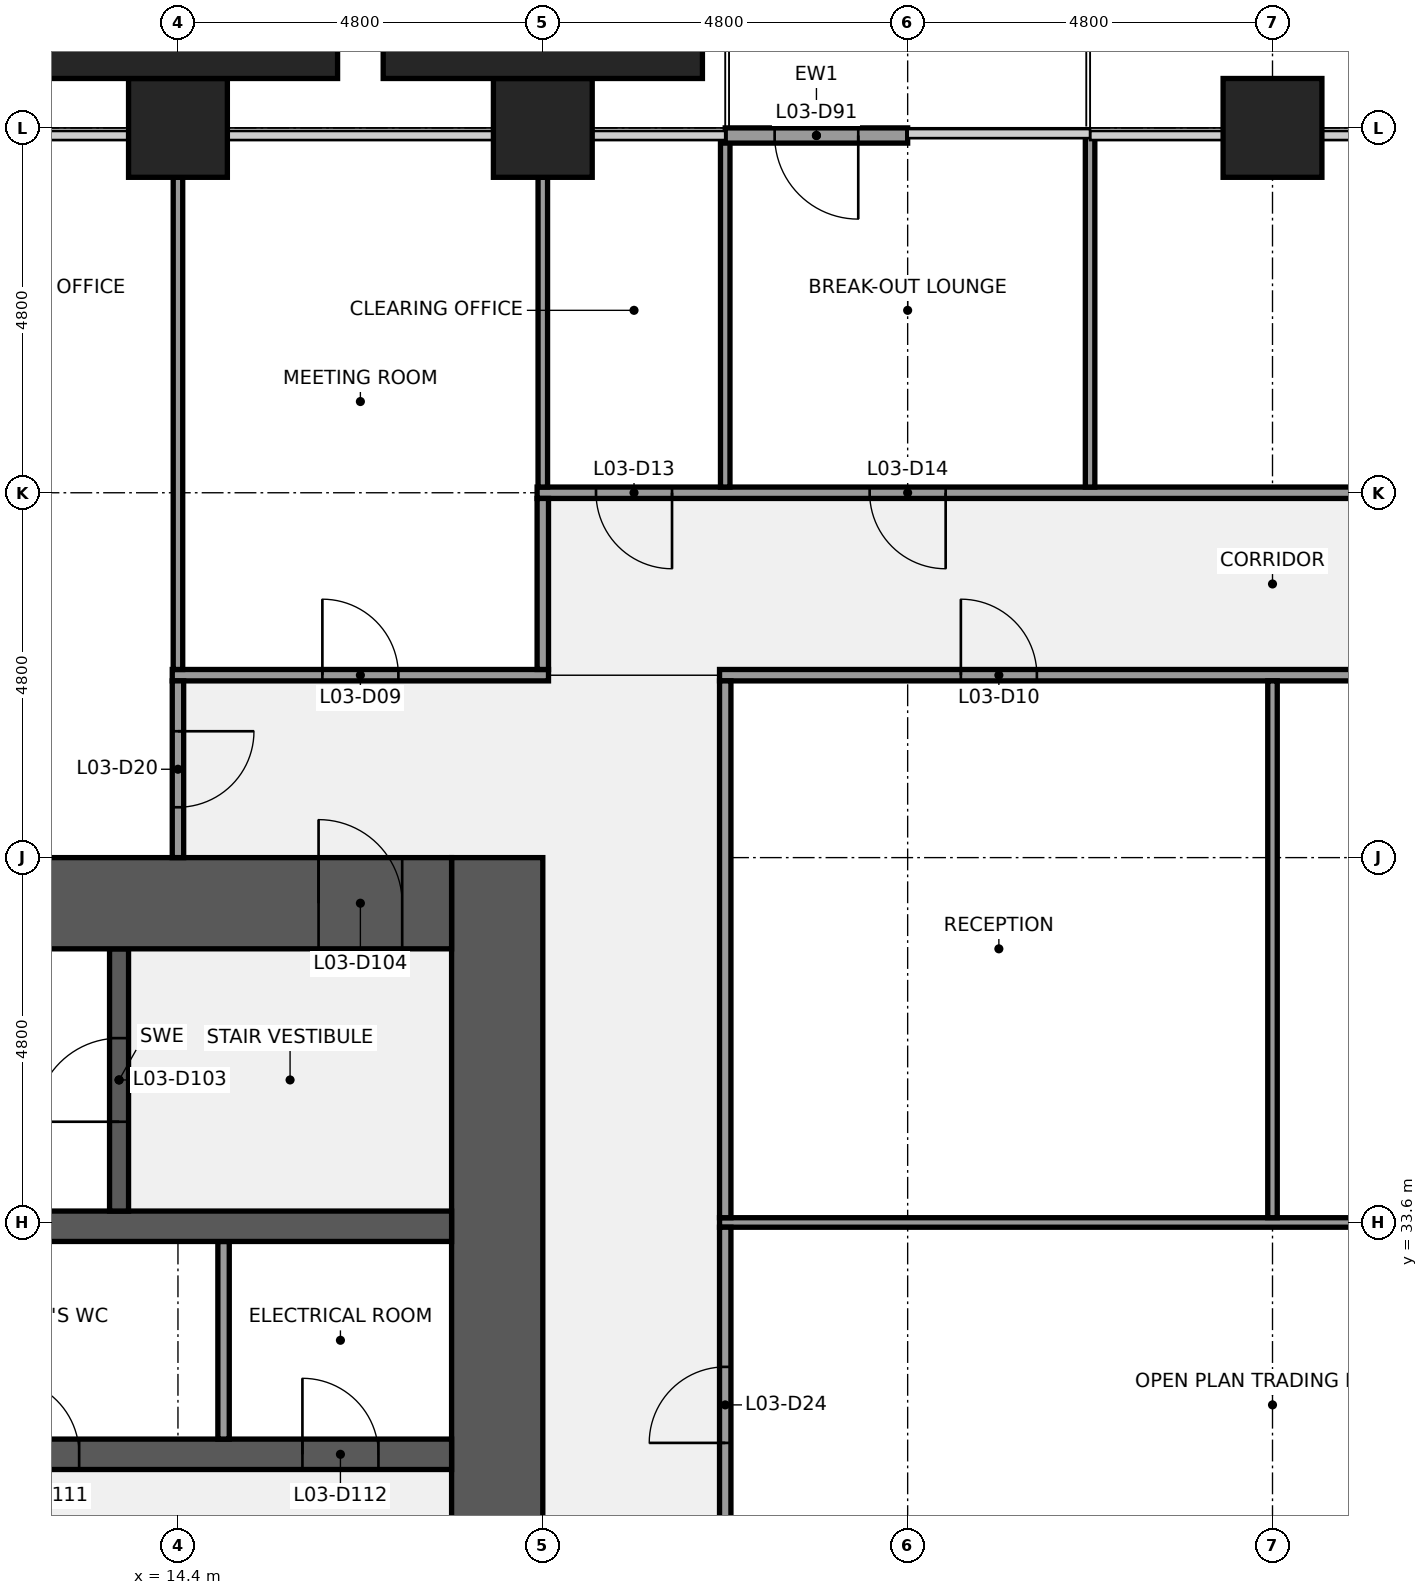
"""IFC4 building model, lengths in metres.
Left out: names, types, materials, properties, quantities, classifications, styles, units other than length and angle.
Written with IfcOpenShell. Run it as: python <this file> out.ifc"""

import sys

from ifc_helpers import new_model, si_unit, direction, frame, frame_2d, origin, origin_2d, place, context, subcontext, project, spatial, rectangle, extrude, element, fill, save


model = new_model("IFC4")
c1 = context("Model", 3, precision=1e-05, world=origin(), true_north=direction((0.0, 1.0)))
c2 = subcontext(c1, "Body", "Model", "MODEL_VIEW")
j1 = project(units=[si_unit("LENGTHUNIT", "METRE"), si_unit("PLANEANGLEUNIT", "RADIAN")], contexts=[c1])
p1 = place(None, origin())
s1 = spatial("IfcSite", under=j1, at=p1, CompositionType="ELEMENT")
p2 = place(p1, origin())
s2 = spatial("IfcBuilding", under=s1, at=p2, CompositionType="ELEMENT")
p3 = place(p2, frame((0.0, 0.0, 21.4)))
s3 = spatial("IfcBuildingStorey", under=s2, at=p3, CompositionType="ELEMENT", Elevation=21.4)
for number, where, z_axis, x_axis in (
    (1, (14.4, 48.0, 0.0), (0.0, 0.0, 1.0), (1.0, 0.0, 0.0)),
    (2, (19.2, 48.0, 0.0), (0.0, 0.0, 1.0), (1.0, 0.0, 0.0)),
    (3, (28.8, 48.0, 0.0), (0.0, 0.0, 1.0), (1.0, 0.0, 0.0)),
):
    element("IfcColumn", number, at=place(p3, frame(where, z_axis=z_axis, x_axis=x_axis)), inside=s3, PredefinedType="COLUMN", context=c2, shape_type="SweptSolid", body=[
        extrude(rectangle(XDim=1.3, YDim=1.3, at=origin_2d()), origin(), (0.0, 0.0, 1.0), 4.4),
    ])
p4 = place(p3, frame((18.6, 38.4, 0.0), z_axis=(0.0, 0.0, 1.0), x_axis=(0.0, -1.0, 0.0)))
e4 = element("IfcWall", 4, at=p4, inside=s3, PredefinedType="SHEAR", context=c2, shape_type="SweptSolid", body=[
    extrude(rectangle(XDim=28.8, YDim=1.2, at=frame_2d((14.4, 0.0))), origin(), (0.0, 0.0, 1.0), 4.24),
])
p5 = place(p4, frame((18.3, 0.0, 0.0)))
e5 = element("IfcOpeningElement", 5, at=p5, cuts=e4, PredefinedType="OPENING", context=c2, shape_type="SweptSolid", body=[
    extrude(rectangle(XDim=1.8, YDim=2.1, at=frame_2d((0.9, 1.05))), frame((0.0, 0.61, 0.0), z_axis=(0.0, -1.0, 0.0), x_axis=(1.0, 0.0, 0.0)), (0.0, 0.0, 1.0), 1.22),
])
p6 = place(p4, frame((8.7, 0.0, 0.0)))
e6 = element("IfcOpeningElement", 6, at=p6, cuts=e4, PredefinedType="OPENING", context=c2, shape_type="SweptSolid", body=[
    extrude(rectangle(XDim=1.8, YDim=2.1, at=frame_2d((0.9, 1.05))), frame((0.0, 0.61, 0.0), z_axis=(0.0, -1.0, 0.0), x_axis=(1.0, 0.0, 0.0)), (0.0, 0.0, 1.0), 1.22),
])
p7 = place(p3, frame((1.2, 30.55, 0.0), z_axis=(0.0, 0.0, 1.0), x_axis=(1.0, 0.0, 0.0)))
e7 = element("IfcWall", 7, at=p7, inside=s3, PredefinedType="SHEAR", context=c2, shape_type="SweptSolid", body=[
    extrude(rectangle(XDim=16.8, YDim=0.4, at=frame_2d((8.4, 0.0))), origin(), (0.0, 0.0, 1.0), 4.24),
])
p8 = place(p7, frame((1.863, 0.0, 0.0)))
e8 = element("IfcOpeningElement", 8, at=p8, cuts=e7, PredefinedType="OPENING", context=c2, shape_type="SweptSolid", body=[
    extrude(rectangle(XDim=1.0, YDim=2.1, at=frame_2d((0.5, 1.05))), frame((0.0, 0.21, 0.0), z_axis=(0.0, -1.0, 0.0), x_axis=(1.0, 0.0, 0.0)), (0.0, 0.0, 1.0), 0.42),
])
p9 = place(p7, frame((6.4, 0.0, 0.0)))
e9 = element("IfcOpeningElement", 9, at=p9, cuts=e7, PredefinedType="OPENING", context=c2, shape_type="SweptSolid", body=[
    extrude(rectangle(XDim=1.0, YDim=2.1, at=frame_2d((0.5, 1.05))), frame((0.0, 0.21, 0.0), z_axis=(0.0, -1.0, 0.0), x_axis=(1.0, 0.0, 0.0)), (0.0, 0.0, 1.0), 0.42),
])
p10 = place(p7, frame((10.9, 0.0, 0.0)))
e10 = element("IfcOpeningElement", 10, at=p10, cuts=e7, PredefinedType="OPENING", context=c2, shape_type="SweptSolid", body=[
    extrude(rectangle(XDim=1.0, YDim=2.1, at=frame_2d((0.5, 1.05))), frame((0.0, 0.21, 0.0), z_axis=(0.0, -1.0, 0.0), x_axis=(1.0, 0.0, 0.0)), (0.0, 0.0, 1.0), 0.42),
])
p11 = place(p7, frame((14.837, 0.0, 0.0)))
e11 = element("IfcOpeningElement", 11, at=p11, cuts=e7, PredefinedType="OPENING", context=c2, shape_type="SweptSolid", body=[
    extrude(rectangle(XDim=1.0, YDim=2.1, at=frame_2d((0.5, 1.05))), frame((0.0, 0.21, 0.0), z_axis=(0.0, -1.0, 0.0), x_axis=(1.0, 0.0, 0.0)), (0.0, 0.0, 1.0), 0.42),
])
p12 = place(p3, frame((15.0, 30.75, 0.0), z_axis=(0.0, 0.0, 1.0), x_axis=(0.0, 1.0, 0.0)))
e12 = element("IfcWall", 12, at=p12, inside=s3, PredefinedType="PARTITIONING", context=c2, shape_type="SweptSolid", body=[
    extrude(rectangle(XDim=2.6, YDim=0.15, at=frame_2d((1.3, 0.0))), origin(), (0.0, 0.0, 1.0), 4.24),
])
p13 = place(p3, frame((1.2, 33.55, 0.0), z_axis=(0.0, 0.0, 1.0), x_axis=(1.0, 0.0, 0.0)))
e13 = element("IfcWall", 13, at=p13, inside=s3, PredefinedType="SHEAR", context=c2, shape_type="SweptSolid", body=[
    extrude(rectangle(XDim=16.8, YDim=0.4, at=frame_2d((8.4, 0.0))), origin(), (0.0, 0.0, 1.0), 4.24),
])
p14 = place(p3, frame((13.625, 33.75, 0.0), z_axis=(0.0, 0.0, 1.0), x_axis=(0.0, 1.0, 0.0)))
e14 = element("IfcWall", 14, at=p14, inside=s3, PredefinedType="SHEAR", context=c2, shape_type="SweptSolid", body=[
    extrude(rectangle(XDim=3.45, YDim=0.25, at=frame_2d((1.725, 0.0))), origin(), (0.0, 0.0, 1.0), 4.24),
])
p15 = place(p14, frame((1.175, 0.0, 0.0)))
e15 = element("IfcOpeningElement", 15, at=p15, cuts=e14, PredefinedType="OPENING", context=c2, shape_type="SweptSolid", body=[
    extrude(rectangle(XDim=1.1, YDim=2.1, at=frame_2d((0.55, 1.05))), frame((0.0, 0.135, 0.0), z_axis=(0.0, -1.0, 0.0), x_axis=(1.0, 0.0, 0.0)), (0.0, 0.0, 1.0), 0.27),
])
p16 = place(p3, frame((4.8, 37.8, 0.0), z_axis=(0.0, 0.0, 1.0), x_axis=(1.0, 0.0, 0.0)))
e16 = element("IfcWall", 16, at=p16, inside=s3, PredefinedType="SHEAR", context=c2, shape_type="SweptSolid", body=[
    extrude(rectangle(XDim=13.2, YDim=1.2, at=frame_2d((6.6, 0.0))), origin(), (0.0, 0.0, 1.0), 4.24),
])
p17 = place(p16, frame((11.45, 0.0, 0.0)))
e17 = element("IfcOpeningElement", 17, at=p17, cuts=e16, PredefinedType="OPENING", context=c2, shape_type="SweptSolid", body=[
    extrude(rectangle(XDim=1.1, YDim=2.1, at=frame_2d((0.55, 1.05))), frame((0.0, 0.61, 0.0), z_axis=(0.0, -1.0, 0.0), x_axis=(1.0, 0.0, 0.0)), (0.0, 0.0, 1.0), 1.22),
])
p18 = place(p3, frame((21.525, 33.6, 0.0), z_axis=(0.0, 0.0, 1.0), x_axis=(1.0, 0.0, 0.0)))
e18 = element("IfcWall", 18, at=p18, inside=s3, PredefinedType="PARTITIONING", context=c2, shape_type="SweptSolid", body=[
    extrude(rectangle(XDim=14.55, YDim=0.125, at=frame_2d((7.275, 0.0))), origin(), (0.0, 0.0, 1.0), 3.27),
])
p19 = place(p3, frame((14.325, 40.8, 0.0), z_axis=(0.0, 0.0, 1.0), x_axis=(1.0, 0.0, 0.0)))
e19 = element("IfcWall", 19, at=p19, inside=s3, PredefinedType="PARTITIONING", context=c2, shape_type="SweptSolid", body=[
    extrude(rectangle(XDim=4.95, YDim=0.15, at=frame_2d((2.475, 0.0))), origin(), (0.0, 0.0, 1.0), 3.27),
])
p20 = place(p19, frame((1.975, 0.0, 0.0)))
e20 = element("IfcOpeningElement", 20, at=p20, cuts=e19, PredefinedType="OPENING", context=c2, shape_type="SweptSolid", body=[
    extrude(rectangle(XDim=1.0, YDim=2.1, at=frame_2d((0.5, 1.05))), frame((0.0, 0.085, 0.0), z_axis=(0.0, -1.0, 0.0), x_axis=(1.0, 0.0, 0.0)), (0.0, 0.0, 1.0), 0.17),
])
p21 = place(p3, frame((21.525, 40.8, 0.0), z_axis=(0.0, 0.0, 1.0), x_axis=(1.0, 0.0, 0.0)))
e21 = element("IfcWall", 21, at=p21, inside=s3, PredefinedType="PARTITIONING", context=c2, shape_type="SweptSolid", body=[
    extrude(rectangle(XDim=14.55, YDim=0.15, at=frame_2d((7.275, 0.0))), origin(), (0.0, 0.0, 1.0), 3.27),
])
p22 = place(p21, frame((3.175, 0.0, 0.0)))
e22 = element("IfcOpeningElement", 22, at=p22, cuts=e21, PredefinedType="OPENING", context=c2, shape_type="SweptSolid", body=[
    extrude(rectangle(XDim=1.0, YDim=2.1, at=frame_2d((0.5, 1.05))), frame((0.0, 0.085, 0.0), z_axis=(0.0, -1.0, 0.0), x_axis=(1.0, 0.0, 0.0)), (0.0, 0.0, 1.0), 0.17),
])
p23 = place(p21, frame((10.375, 0.0, 0.0)))
e23 = element("IfcOpeningElement", 23, at=p23, cuts=e21, PredefinedType="OPENING", context=c2, shape_type="SweptSolid", body=[
    extrude(rectangle(XDim=1.0, YDim=2.1, at=frame_2d((0.5, 1.05))), frame((0.0, 0.085, 0.0), z_axis=(0.0, -1.0, 0.0), x_axis=(1.0, 0.0, 0.0)), (0.0, 0.0, 1.0), 0.17),
])
p24 = place(p3, frame((19.125, 43.2, 0.0), z_axis=(0.0, 0.0, 1.0), x_axis=(1.0, 0.0, 0.0)))
e24 = element("IfcWall", 24, at=p24, inside=s3, PredefinedType="PARTITIONING", context=c2, shape_type="SweptSolid", body=[
    extrude(rectangle(XDim=19.35, YDim=0.15, at=frame_2d((9.675, 0.0))), origin(), (0.0, 0.0, 1.0), 3.27),
])
p25 = place(p24, frame((0.775, 0.0, 0.0)))
e25 = element("IfcOpeningElement", 25, at=p25, cuts=e24, PredefinedType="OPENING", context=c2, shape_type="SweptSolid", body=[
    extrude(rectangle(XDim=1.0, YDim=2.1, at=frame_2d((0.5, 1.05))), frame((0.0, 0.085, 0.0), z_axis=(0.0, -1.0, 0.0), x_axis=(1.0, 0.0, 0.0)), (0.0, 0.0, 1.0), 0.17),
])
p26 = place(p24, frame((4.375, 0.0, 0.0)))
e26 = element("IfcOpeningElement", 26, at=p26, cuts=e24, PredefinedType="OPENING", context=c2, shape_type="SweptSolid", body=[
    extrude(rectangle(XDim=1.0, YDim=2.1, at=frame_2d((0.5, 1.05))), frame((0.0, 0.085, 0.0), z_axis=(0.0, -1.0, 0.0), x_axis=(1.0, 0.0, 0.0)), (0.0, 0.0, 1.0), 0.17),
])
p27 = place(p24, frame((12.775, 0.0, 0.0)))
e27 = element("IfcOpeningElement", 27, at=p27, cuts=e24, PredefinedType="OPENING", context=c2, shape_type="SweptSolid", body=[
    extrude(rectangle(XDim=1.0, YDim=2.1, at=frame_2d((0.5, 1.05))), frame((0.0, 0.085, 0.0), z_axis=(0.0, -1.0, 0.0), x_axis=(1.0, 0.0, 0.0)), (0.0, 0.0, 1.0), 0.17),
])
p28 = place(p3, frame((14.4, 40.875, 0.0), z_axis=(0.0, 0.0, 1.0), x_axis=(0.0, 1.0, 0.0)))
e28 = element("IfcWall", 28, at=p28, inside=s3, PredefinedType="PARTITIONING", context=c2, shape_type="SweptSolid", body=[
    extrude(rectangle(XDim=6.475, YDim=0.125, at=frame_2d((3.238, 0.0))), origin(), (0.0, 0.0, 1.0), 3.27),
])
p29 = place(p3, frame((14.4, 38.4, 0.0), z_axis=(0.0, 0.0, 1.0), x_axis=(0.0, 1.0, 0.0)))
e29 = element("IfcWall", 29, at=p29, inside=s3, PredefinedType="PARTITIONING", context=c2, shape_type="SweptSolid", body=[
    extrude(rectangle(XDim=2.325, YDim=0.15, at=frame_2d((1.163, 0.0))), origin(), (0.0, 0.0, 1.0), 3.27),
])
p30 = place(p29, frame((0.663, 0.0, 0.0)))
e30 = element("IfcOpeningElement", 30, at=p30, cuts=e29, PredefinedType="OPENING", context=c2, shape_type="SweptSolid", body=[
    extrude(rectangle(XDim=1.0, YDim=2.1, at=frame_2d((0.5, 1.05))), frame((0.0, 0.085, 0.0), z_axis=(0.0, -1.0, 0.0), x_axis=(1.0, 0.0, 0.0)), (0.0, 0.0, 1.0), 0.17),
])
p31 = place(p3, frame((19.2, 43.275, 0.0), z_axis=(0.0, 0.0, 1.0), x_axis=(0.0, 1.0, 0.0)))
e31 = element("IfcWall", 31, at=p31, inside=s3, PredefinedType="PARTITIONING", context=c2, shape_type="SweptSolid", body=[
    extrude(rectangle(XDim=4.075, YDim=0.125, at=frame_2d((2.038, 0.0))), origin(), (0.0, 0.0, 1.0), 3.27),
])
p32 = place(p3, frame((19.2, 40.875, 0.0), z_axis=(0.0, 0.0, 1.0), x_axis=(0.0, 1.0, 0.0)))
e32 = element("IfcWall", 32, at=p32, inside=s3, PredefinedType="PARTITIONING", context=c2, shape_type="SweptSolid", body=[
    extrude(rectangle(XDim=2.25, YDim=0.15, at=frame_2d((1.125, 0.0))), origin(), (0.0, 0.0, 1.0), 3.27),
])
p33 = place(p3, frame((21.6, 43.275, 0.0), z_axis=(0.0, 0.0, 1.0), x_axis=(0.0, 1.0, 0.0)))
e33 = element("IfcWall", 33, at=p33, inside=s3, PredefinedType="PARTITIONING", context=c2, shape_type="SweptSolid", body=[
    extrude(rectangle(XDim=4.625, YDim=0.125, at=frame_2d((2.312, 0.0))), origin(), (0.0, 0.0, 1.0), 3.27),
])
p34 = place(p3, frame((21.6, 28.863, 0.0), z_axis=(0.0, 0.0, 1.0), x_axis=(0.0, 1.0, 0.0)))
e34 = element("IfcWall", 34, at=p34, inside=s3, PredefinedType="PARTITIONING", context=c2, shape_type="SweptSolid", body=[
    extrude(rectangle(XDim=4.675, YDim=0.15, at=frame_2d((2.337, 0.0))), origin(), (0.0, 0.0, 1.0), 3.27),
])
p35 = place(p34, frame((1.837, 0.0, 0.0)))
e35 = element("IfcOpeningElement", 35, at=p35, cuts=e34, PredefinedType="OPENING", context=c2, shape_type="SweptSolid", body=[
    extrude(rectangle(XDim=1.0, YDim=2.1, at=frame_2d((0.5, 1.05))), frame((0.0, 0.085, 0.0), z_axis=(0.0, -1.0, 0.0), x_axis=(1.0, 0.0, 0.0)), (0.0, 0.0, 1.0), 0.17),
])
p36 = place(p3, frame((21.6, 33.663, 0.0), z_axis=(0.0, 0.0, 1.0), x_axis=(0.0, 1.0, 0.0)))
e36 = element("IfcWall", 36, at=p36, inside=s3, PredefinedType="PARTITIONING", context=c2, shape_type="SweptSolid", body=[
    extrude(rectangle(XDim=7.062, YDim=0.15, at=frame_2d((3.531, 0.0))), origin(), (0.0, 0.0, 1.0), 3.27),
])
p37 = place(p3, frame((26.4, 43.275, 0.0), z_axis=(0.0, 0.0, 1.0), x_axis=(0.0, 1.0, 0.0)))
e37 = element("IfcWall", 37, at=p37, inside=s3, PredefinedType="PARTITIONING", context=c2, shape_type="SweptSolid", body=[
    extrude(rectangle(XDim=4.625, YDim=0.125, at=frame_2d((2.312, 0.0))), origin(), (0.0, 0.0, 1.0), 3.27),
])
p38 = place(p3, frame((28.8, 33.663, 0.0), z_axis=(0.0, 0.0, 1.0), x_axis=(0.0, 1.0, 0.0)))
e38 = element("IfcWall", 38, at=p38, inside=s3, PredefinedType="PARTITIONING", context=c2, shape_type="SweptSolid", body=[
    extrude(rectangle(XDim=7.062, YDim=0.125, at=frame_2d((3.531, 0.0))), origin(), (0.0, 0.0, 1.0), 3.27),
])
p39 = place(p3, frame((24.0, 47.9, 0.0), z_axis=(0.0, 0.0, 1.0), x_axis=(-1.0, 0.0, 0.0)))
e39 = element("IfcWall", 39, at=p39, inside=s3, PredefinedType="SOLIDWALL", context=c2, shape_type="SweptSolid", body=[
    extrude(rectangle(XDim=2.4, YDim=0.2, at=frame_2d((1.2, 0.0))), origin(), (0.0, 0.0, 1.0), 3.714),
])
p40 = place(p39, frame((0.65, 0.0, 0.0)))
e40 = element("IfcOpeningElement", 40, at=p40, cuts=e39, PredefinedType="OPENING", context=c2, shape_type="SweptSolid", body=[
    extrude(rectangle(XDim=1.1, YDim=2.1, at=frame_2d((0.55, 1.05))), frame((0.0, 0.11, 0.0), z_axis=(0.0, -1.0, 0.0), x_axis=(1.0, 0.0, 0.0)), (0.0, 0.0, 1.0), 0.22),
])
for number, where, z_axis, x_axis in (
    (41, (14.4, 49.075, 0.0), (0.0, 0.0, 1.0), (1.0, 0.0, 0.0)),
    (42, (19.2, 49.075, 0.0), (0.0, 0.0, 1.0), (1.0, 0.0, 0.0)),
):
    element("IfcColumn", number, at=place(p3, frame(where, z_axis=z_axis, x_axis=x_axis)), inside=s3, PredefinedType="PILASTER", context=c2, shape_type="SweptSolid", body=[
        extrude(rectangle(XDim=4.2, YDim=0.85, at=origin_2d()), origin(), (0.0, 0.0, 1.0), 4.4),
    ])
p41 = place(p15, origin())
e43 = element("IfcDoor", 43, at=p41, inside=s3, OperationType="SINGLE_SWING_LEFT", PredefinedType="DOOR", context=c2, shape_type="SweptSolid", body=[
    extrude(rectangle(XDim=1.1, YDim=2.1, at=frame_2d((0.55, 1.05))), frame((0.0, 0.025, 0.0), z_axis=(0.0, -1.0, 0.0), x_axis=(1.0, 0.0, 0.0)), (0.0, 0.0, 1.0), 0.05),
])
fill(e15, e43)
p42 = place(p17, origin())
e44 = element("IfcDoor", 44, at=p42, inside=s3, OperationType="SINGLE_SWING_LEFT", PredefinedType="DOOR", context=c2, shape_type="SweptSolid", body=[
    extrude(rectangle(XDim=1.1, YDim=2.1, at=frame_2d((0.55, 1.05))), frame((0.0, 0.025, 0.0), z_axis=(0.0, -1.0, 0.0), x_axis=(1.0, 0.0, 0.0)), (0.0, 0.0, 1.0), 0.05),
])
fill(e17, e44)
p43 = place(p10, origin())
e45 = element("IfcDoor", 45, at=p43, inside=s3, OperationType="SINGLE_SWING_LEFT", PredefinedType="DOOR", context=c2, shape_type="SweptSolid", body=[
    extrude(rectangle(XDim=1.0, YDim=2.1, at=frame_2d((0.5, 1.05))), frame((0.0, 0.025, 0.0), z_axis=(0.0, -1.0, 0.0), x_axis=(1.0, 0.0, 0.0)), (0.0, 0.0, 1.0), 0.05),
])
fill(e10, e45)
p44 = place(p11, origin())
e46 = element("IfcDoor", 46, at=p44, inside=s3, OperationType="SINGLE_SWING_LEFT", PredefinedType="DOOR", context=c2, shape_type="SweptSolid", body=[
    extrude(rectangle(XDim=1.0, YDim=2.1, at=frame_2d((0.5, 1.05))), frame((0.0, 0.025, 0.0), z_axis=(0.0, -1.0, 0.0), x_axis=(1.0, 0.0, 0.0)), (0.0, 0.0, 1.0), 0.05),
])
fill(e11, e46)
p45 = place(p20, origin())
e47 = element("IfcDoor", 47, at=p45, inside=s3, OperationType="SINGLE_SWING_LEFT", PredefinedType="DOOR", context=c2, shape_type="SweptSolid", body=[
    extrude(rectangle(XDim=1.0, YDim=2.1, at=frame_2d((0.5, 1.05))), frame((0.0, 0.025, 0.0), z_axis=(0.0, -1.0, 0.0), x_axis=(1.0, 0.0, 0.0)), (0.0, 0.0, 1.0), 0.05),
])
fill(e20, e47)
p46 = place(p22, origin())
e48 = element("IfcDoor", 48, at=p46, inside=s3, OperationType="SINGLE_SWING_LEFT", PredefinedType="DOOR", context=c2, shape_type="SweptSolid", body=[
    extrude(rectangle(XDim=1.0, YDim=2.1, at=frame_2d((0.5, 1.05))), frame((0.0, 0.025, 0.0), z_axis=(0.0, -1.0, 0.0), x_axis=(1.0, 0.0, 0.0)), (0.0, 0.0, 1.0), 0.05),
])
fill(e22, e48)
p47 = place(p25, origin())
e49 = element("IfcDoor", 49, at=p47, inside=s3, OperationType="SINGLE_SWING_RIGHT", PredefinedType="DOOR", context=c2, shape_type="SweptSolid", body=[
    extrude(rectangle(XDim=1.0, YDim=2.1, at=frame_2d((0.5, 1.05))), frame((0.0, 0.025, 0.0), z_axis=(0.0, -1.0, 0.0), x_axis=(1.0, 0.0, 0.0)), (0.0, 0.0, 1.0), 0.05),
])
fill(e25, e49)
p48 = place(p26, origin())
e50 = element("IfcDoor", 50, at=p48, inside=s3, OperationType="SINGLE_SWING_RIGHT", PredefinedType="DOOR", context=c2, shape_type="SweptSolid", body=[
    extrude(rectangle(XDim=1.0, YDim=2.1, at=frame_2d((0.5, 1.05))), frame((0.0, 0.025, 0.0), z_axis=(0.0, -1.0, 0.0), x_axis=(1.0, 0.0, 0.0)), (0.0, 0.0, 1.0), 0.05),
])
fill(e26, e50)
p49 = place(p30, origin())
e51 = element("IfcDoor", 51, at=p49, inside=s3, OperationType="SINGLE_SWING_RIGHT", PredefinedType="DOOR", context=c2, shape_type="SweptSolid", body=[
    extrude(rectangle(XDim=1.0, YDim=2.1, at=frame_2d((0.5, 1.05))), frame((0.0, 0.025, 0.0), z_axis=(0.0, -1.0, 0.0), x_axis=(1.0, 0.0, 0.0)), (0.0, 0.0, 1.0), 0.05),
])
fill(e30, e51)
p50 = place(p35, origin())
e52 = element("IfcDoor", 52, at=p50, inside=s3, OperationType="SINGLE_SWING_LEFT", PredefinedType="DOOR", context=c2, shape_type="SweptSolid", body=[
    extrude(rectangle(XDim=1.0, YDim=2.1, at=frame_2d((0.5, 1.05))), frame((0.0, 0.025, 0.0), z_axis=(0.0, -1.0, 0.0), x_axis=(1.0, 0.0, 0.0)), (0.0, 0.0, 1.0), 0.05),
])
fill(e35, e52)
p51 = place(p40, origin())
e53 = element("IfcDoor", 53, at=p51, inside=s3, OperationType="SINGLE_SWING_LEFT", PredefinedType="DOOR", context=c2, shape_type="SweptSolid", body=[
    extrude(rectangle(XDim=1.1, YDim=2.1, at=frame_2d((0.55, 1.05))), frame((0.0, 0.025, 0.0), z_axis=(0.0, -1.0, 0.0), x_axis=(1.0, 0.0, 0.0)), (0.0, 0.0, 1.0), 0.05),
])
fill(e40, e53)
save(model, sys.argv[1])
